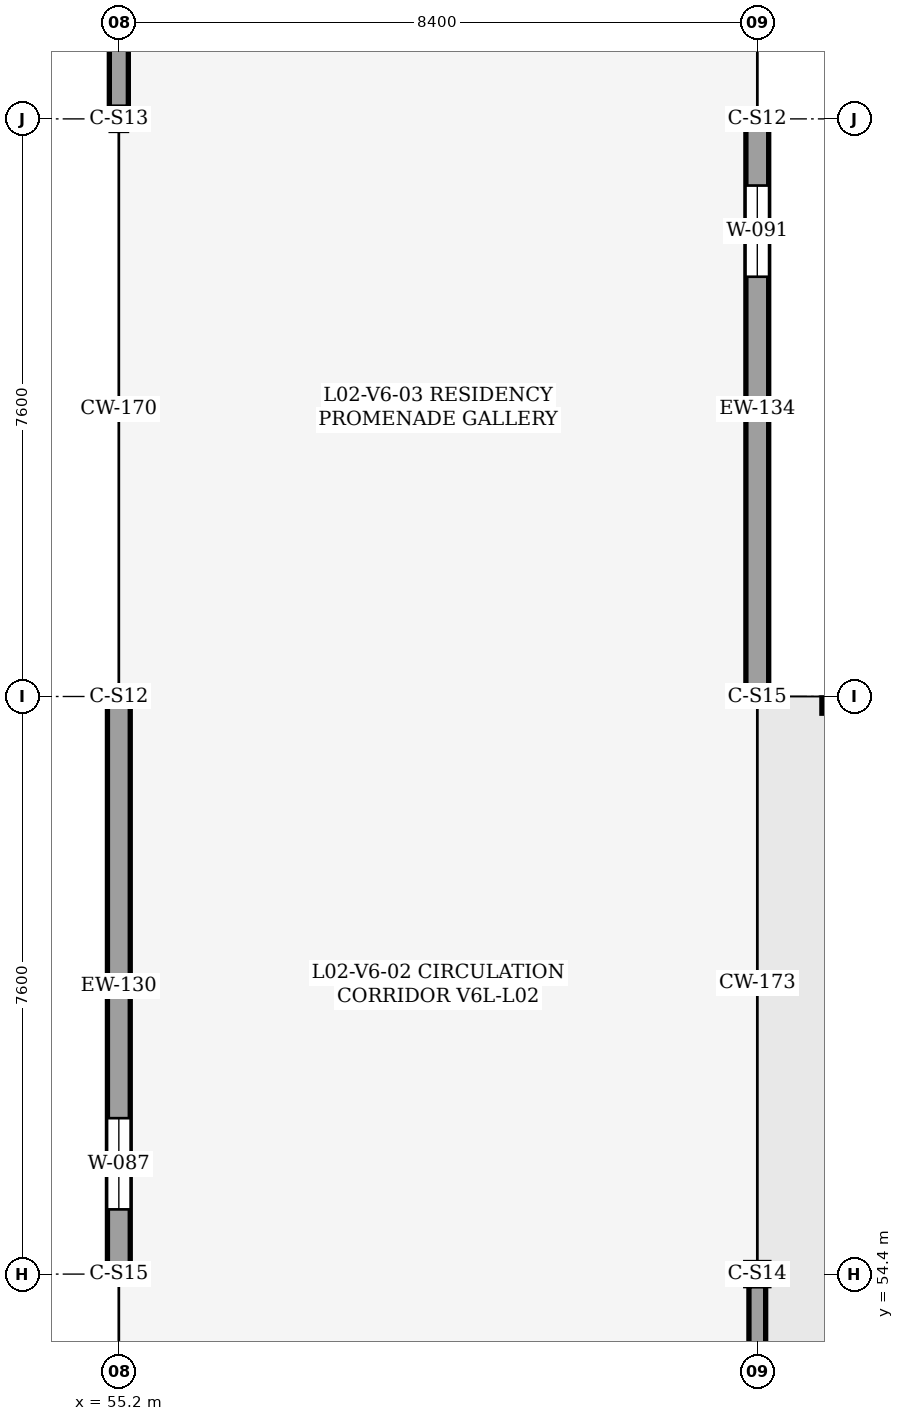
"""IFC4 building model, lengths in metres.
Left out: names, types, materials, properties, quantities, classifications, styles, units other than length and angle.
Written with IfcOpenShell. Run it as: python <this file> out.ifc"""

import sys

from ifc_helpers import new_model, si_unit, direction, frame, frame_2d, origin, origin_2d, place, context, subcontext, project, spatial, rectangle, hollow_rectangle, extrude, element, fill, save


model = new_model("IFC4")
c1 = context("Model", 3, precision=1e-05, world=origin(), true_north=direction((0.0, 1.0)))
c2 = subcontext(c1, "Body", "Model", "MODEL_VIEW")
j1 = project(units=[si_unit("LENGTHUNIT", "METRE"), si_unit("PLANEANGLEUNIT", "RADIAN")], contexts=[c1])
p1 = place(None, origin())
s1 = spatial("IfcSite", under=j1, at=p1, CompositionType="ELEMENT")
p2 = place(p1, origin())
s2 = spatial("IfcBuilding", under=s1, at=p2, CompositionType="ELEMENT")
p3 = place(p2, frame((0.0, 0.0, 10.2)))
s3 = spatial("IfcBuildingStorey", under=s2, at=p3, CompositionType="ELEMENT", Elevation=10.2)
p4 = place(p3, frame((55.2, 54.4, 0.0), z_axis=(0.0, 0.0, 1.0), x_axis=(1.0, 0.0, 0.0)))
e1 = element("IfcColumn", 1, at=p4, inside=s3, PredefinedType="COLUMN", context=c2, shape_type="SweptSolid", body=[
    extrude(hollow_rectangle(XDim=0.203, YDim=0.203, WallThickness=0.013, OuterFilletRadius=0.025, at=origin_2d()), origin(), (0.0, 0.0, 1.0), 4.8),
])
p5 = place(p3, frame((55.2, 62.0, 0.0), z_axis=(0.0, 0.0, 1.0), x_axis=(1.0, 0.0, 0.0)))
e2 = element("IfcColumn", 2, at=p5, inside=s3, PredefinedType="COLUMN", context=c2, shape_type="SweptSolid", body=[
    extrude(hollow_rectangle(XDim=0.254, YDim=0.254, WallThickness=0.013, OuterFilletRadius=0.025, at=origin_2d()), origin(), (0.0, 0.0, 1.0), 4.8),
])
p6 = place(p3, frame((55.2, 69.6, 0.0), z_axis=(0.0, 0.0, 1.0), x_axis=(1.0, 0.0, 0.0)))
e3 = element("IfcColumn", 3, at=p6, inside=s3, PredefinedType="COLUMN", context=c2, shape_type="SweptSolid", body=[
    extrude(hollow_rectangle(XDim=0.203, YDim=0.305, WallThickness=0.013, OuterFilletRadius=0.025, at=origin_2d()), origin(), (0.0, 0.0, 1.0), 4.8),
])
p7 = place(p3, frame((63.6, 54.4, 0.0), z_axis=(0.0, 0.0, 1.0), x_axis=(1.0, 0.0, 0.0)))
e4 = element("IfcColumn", 4, at=p7, inside=s3, PredefinedType="COLUMN", context=c2, shape_type="SweptSolid", body=[
    extrude(hollow_rectangle(XDim=0.305, YDim=0.305, WallThickness=0.016, OuterFilletRadius=0.032, at=origin_2d()), origin(), (0.0, 0.0, 1.0), 4.8),
])
p8 = place(p3, frame((63.6, 62.0, 0.0), z_axis=(0.0, 0.0, 1.0), x_axis=(1.0, 0.0, 0.0)))
e5 = element("IfcColumn", 5, at=p8, inside=s3, PredefinedType="COLUMN", context=c2, shape_type="SweptSolid", body=[
    extrude(hollow_rectangle(XDim=0.203, YDim=0.203, WallThickness=0.013, OuterFilletRadius=0.025, at=origin_2d()), origin(), (0.0, 0.0, 1.0), 4.8),
])
p9 = place(p3, frame((63.6, 69.6, 0.0), z_axis=(0.0, 0.0, 1.0), x_axis=(1.0, 0.0, 0.0)))
e6 = element("IfcColumn", 6, at=p9, inside=s3, PredefinedType="COLUMN", context=c2, shape_type="SweptSolid", body=[
    extrude(hollow_rectangle(XDim=0.254, YDim=0.254, WallThickness=0.013, OuterFilletRadius=0.025, at=origin_2d()), origin(), (0.0, 0.0, 1.0), 4.8),
])
p10 = place(p3, frame((55.2, 54.502, 0.0), z_axis=(0.0, 0.0, 1.0), x_axis=(0.0, 1.0, 0.0)))
e7 = element("IfcWall", 7, at=p10, inside=s3, PredefinedType="SOLIDWALL", context=c2, shape_type="SweptSolid", body=[
    extrude(rectangle(XDim=7.371, YDim=0.3, at=frame_2d((3.686, 0.0))), origin(), (0.0, 0.0, 1.0), 4.007),
])
p11 = place(p10, frame((0.75, 0.0, 0.9)))
e8 = element("IfcOpeningElement", 8, at=p11, cuts=e7, PredefinedType="OPENING", context=c2, shape_type="SweptSolid", body=[
    extrude(rectangle(XDim=1.2, YDim=1.5, at=frame_2d((0.6, 0.75))), frame((0.0, 0.16, 0.0), z_axis=(0.0, -1.0, 0.0), x_axis=(1.0, 0.0, 0.0)), (0.0, 0.0, 1.0), 0.321),
])
p12 = place(p3, frame((55.2, 69.752, 0.0), z_axis=(0.0, 0.0, 1.0), x_axis=(0.0, 1.0, 0.0)))
e9 = element("IfcWall", 9, at=p12, inside=s3, PredefinedType="SOLIDWALL", context=c2, shape_type="SweptSolid", body=[
    extrude(rectangle(XDim=6.895, YDim=0.25, at=frame_2d((3.448, 0.0))), origin(), (0.0, 0.0, 1.0), 3.928),
])
p13 = place(p12, frame((0.75, 0.0, 0.9)))
e10 = element("IfcOpeningElement", 10, at=p13, cuts=e9, PredefinedType="OPENING", context=c2, shape_type="SweptSolid", body=[
    extrude(rectangle(XDim=1.2, YDim=1.5, at=frame_2d((0.6, 0.75))), frame((0.0, 0.135, 0.0), z_axis=(0.0, -1.0, 0.0), x_axis=(1.0, 0.0, 0.0)), (0.0, 0.0, 1.0), 0.271),
])
p14 = place(p3, frame((63.6, 54.248, 0.0), z_axis=(0.0, 0.0, 1.0), x_axis=(0.0, -1.0, 0.0)))
e11 = element("IfcWall", 11, at=p14, inside=s3, PredefinedType="SOLIDWALL", context=c2, shape_type="SweptSolid", body=[
    extrude(rectangle(XDim=7.26, YDim=0.22, at=frame_2d((3.63, 0.0))), origin(), (0.0, 0.0, 1.0), 4.007),
])
p15 = place(p14, frame((0.75, 0.0, 0.9)))
e12 = element("IfcOpeningElement", 12, at=p15, cuts=e11, PredefinedType="OPENING", context=c2, shape_type="SweptSolid", body=[
    extrude(rectangle(XDim=1.2, YDim=1.5, at=frame_2d((0.6, 0.75))), frame((0.0, 0.12, 0.0), z_axis=(0.0, -1.0, 0.0), x_axis=(1.0, 0.0, 0.0)), (0.0, 0.0, 1.0), 0.24),
])
p16 = place(p3, frame((63.6, 69.473, 0.0), z_axis=(0.0, 0.0, 1.0), x_axis=(0.0, -1.0, 0.0)))
e13 = element("IfcWall", 13, at=p16, inside=s3, PredefinedType="SOLIDWALL", context=c2, shape_type="SweptSolid", body=[
    extrude(rectangle(XDim=7.371, YDim=0.3, at=frame_2d((3.686, 0.0))), origin(), (0.0, 0.0, 1.0), 3.928),
])
p17 = place(p16, frame((0.75, 0.0, 0.9)))
e14 = element("IfcOpeningElement", 14, at=p17, cuts=e13, PredefinedType="OPENING", context=c2, shape_type="SweptSolid", body=[
    extrude(rectangle(XDim=1.2, YDim=1.5, at=frame_2d((0.6, 0.75))), frame((0.0, 0.16, 0.0), z_axis=(0.0, -1.0, 0.0), x_axis=(1.0, 0.0, 0.0)), (0.0, 0.0, 1.0), 0.321),
])
p18 = place(p3, frame((64.45, 61.88, 0.0), z_axis=(0.0, 0.0, 1.0), x_axis=(1.0, 0.0, 0.0)))
e15 = element("IfcWall", 15, at=p18, inside=s3, PredefinedType="PARAPET", context=c2, shape_type="SweptSolid", body=[
    extrude(rectangle(XDim=47.5, YDim=0.2, at=frame_2d((23.75, 0.0))), origin(), (0.0, 0.0, 1.0), 0.95),
])
p19 = place(p11, origin())
e16 = element("IfcWindow", 16, at=p19, inside=s3, PartitioningType="SINGLE_PANEL", PredefinedType="WINDOW", context=c2, shape_type="SweptSolid", body=[
    extrude(rectangle(XDim=1.2, YDim=1.5, at=frame_2d((0.6, 0.75))), frame((0.0, 0.03, 0.0), z_axis=(0.0, -1.0, 0.0), x_axis=(1.0, 0.0, 0.0)), (0.0, 0.0, 1.0), 0.06),
])
fill(e8, e16)
p20 = place(p17, origin())
e17 = element("IfcWindow", 17, at=p20, inside=s3, PartitioningType="SINGLE_PANEL", PredefinedType="WINDOW", context=c2, shape_type="SweptSolid", body=[
    extrude(rectangle(XDim=1.2, YDim=1.5, at=frame_2d((0.6, 0.75))), frame((0.0, 0.03, 0.0), z_axis=(0.0, -1.0, 0.0), x_axis=(1.0, 0.0, 0.0)), (0.0, 0.0, 1.0), 0.06),
])
fill(e14, e17)
save(model, sys.argv[1])
